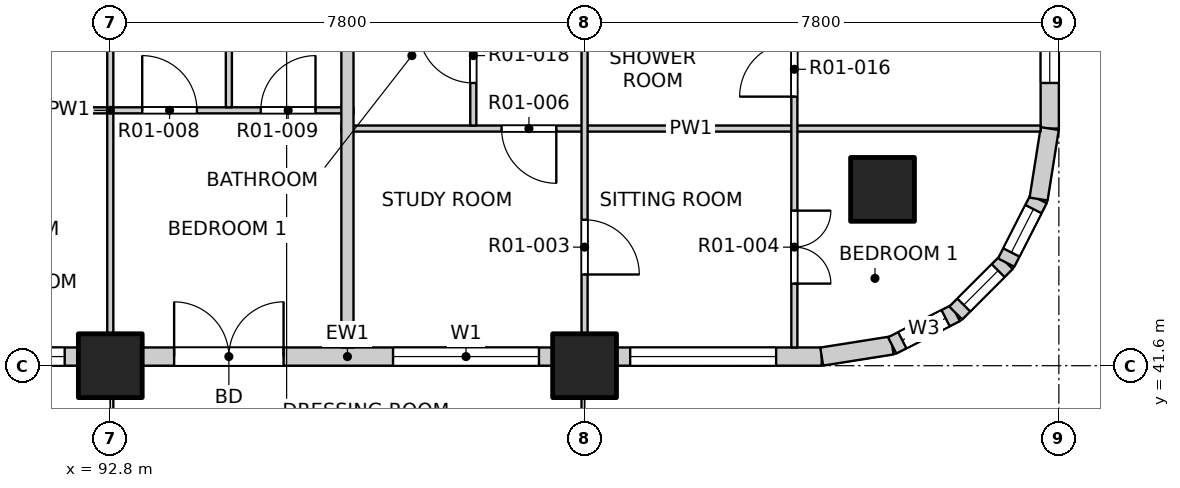
"""IFC4 building model, lengths in metres.
Left out: names, types, materials, properties, quantities, classifications, styles, units other than length and angle.
Written with IfcOpenShell. Run it as: python <this file> out.ifc"""

import sys

from ifc_helpers import new_model, si_unit, direction, frame, frame_2d, origin, origin_2d, place, context, subcontext, project, spatial, rectangle, extrude, element, fill, save


model = new_model("IFC4")
c1 = context("Model", 3, precision=1e-05, world=origin(), true_north=direction((0.0, 1.0)))
c2 = subcontext(c1, "Body", "Model", "MODEL_VIEW")
j1 = project(units=[si_unit("LENGTHUNIT", "METRE"), si_unit("PLANEANGLEUNIT", "RADIAN")], contexts=[c1])
p1 = place(None, origin())
s1 = spatial("IfcSite", under=j1, at=p1, CompositionType="ELEMENT")
p2 = place(p1, origin())
s2 = spatial("IfcBuilding", under=s1, at=p2, CompositionType="ELEMENT")
p3 = place(p2, frame((0.0, 0.0, 19.5)))
s3 = spatial("IfcBuildingStorey", under=s2, at=p3, CompositionType="ELEMENT", Elevation=19.5)
for number, where, z_axis, x_axis in (
    (1, (105.5, 44.5, -0.25), (0.0, 0.0, 1.0), (1.0, 0.0, 0.0)),
    (2, (92.8, 41.6, -0.25), (0.0, 0.0, 1.0), (1.0, 0.0, 0.0)),
    (3, (100.6, 41.6, -0.25), (0.0, 0.0, 1.0), (1.0, 0.0, 0.0)),
):
    element("IfcColumn", number, at=place(p3, frame(where, z_axis=z_axis, x_axis=x_axis)), inside=s3, PredefinedType="COLUMN", context=c2, shape_type="SweptSolid", body=[
        extrude(rectangle(XDim=1.05, YDim=1.05, at=origin_2d()), origin(), (0.0, 0.0, 1.0), 3.4),
    ])
p4 = place(p3, frame((85.525, 41.75, 0.0), z_axis=(0.0, 0.0, 1.0), x_axis=(1.0, 0.0, 0.0)))
e4 = element("IfcWall", 4, at=p4, inside=s3, PredefinedType="SOLIDWALL", context=c2, shape_type="SweptSolid", body=[
    extrude(rectangle(XDim=6.75, YDim=0.3, at=frame_2d((3.375, 0.0))), origin(), (0.0, 0.0, 1.0), 2.7),
])
p5 = place(p4, frame((0.225, 0.0, 0.9)))
e5 = element("IfcOpeningElement", 5, at=p5, cuts=e4, PredefinedType="OPENING", context=c2, shape_type="SweptSolid", body=[
    extrude(rectangle(XDim=2.4, YDim=1.8, at=frame_2d((1.2, 0.9))), frame((0.0, 0.16, 0.0), z_axis=(0.0, -1.0, 0.0), x_axis=(1.0, 0.0, 0.0)), (0.0, 0.0, 1.0), 0.32),
])
p6 = place(p4, frame((4.125, 0.0, 0.9)))
e6 = element("IfcOpeningElement", 6, at=p6, cuts=e4, PredefinedType="OPENING", context=c2, shape_type="SweptSolid", body=[
    extrude(rectangle(XDim=2.4, YDim=1.8, at=frame_2d((1.2, 0.9))), frame((0.0, 0.16, 0.0), z_axis=(0.0, -1.0, 0.0), x_axis=(1.0, 0.0, 0.0)), (0.0, 0.0, 1.0), 0.32),
])
p7 = place(p3, frame((93.325, 41.75, 0.0), z_axis=(0.0, 0.0, 1.0), x_axis=(1.0, 0.0, 0.0)))
e7 = element("IfcWall", 7, at=p7, inside=s3, PredefinedType="SOLIDWALL", context=c2, shape_type="SweptSolid", body=[
    extrude(rectangle(XDim=6.75, YDim=0.3, at=frame_2d((3.375, 0.0))), origin(), (0.0, 0.0, 1.0), 2.7),
])
p8 = place(p7, frame((0.525, 0.0, 0.0)))
e8 = element("IfcOpeningElement", 8, at=p8, cuts=e7, PredefinedType="OPENING", context=c2, shape_type="SweptSolid", body=[
    extrude(rectangle(XDim=1.8, YDim=2.4, at=frame_2d((0.9, 1.2))), frame((0.0, 0.16, 0.0), z_axis=(0.0, -1.0, 0.0), x_axis=(1.0, 0.0, 0.0)), (0.0, 0.0, 1.0), 0.32),
])
p9 = place(p7, frame((4.125, 0.0, 0.9)))
e9 = element("IfcOpeningElement", 9, at=p9, cuts=e7, PredefinedType="OPENING", context=c2, shape_type="SweptSolid", body=[
    extrude(rectangle(XDim=2.4, YDim=1.8, at=frame_2d((1.2, 0.9))), frame((0.0, 0.16, 0.0), z_axis=(0.0, -1.0, 0.0), x_axis=(1.0, 0.0, 0.0)), (0.0, 0.0, 1.0), 0.32),
])
p10 = place(p3, frame((101.125, 41.75, 0.0), z_axis=(0.0, 0.0, 1.0), x_axis=(1.0, 0.0, 0.0)))
e10 = element("IfcWall", 10, at=p10, inside=s3, PredefinedType="SOLIDWALL", context=c2, shape_type="SweptSolid", body=[
    extrude(rectangle(XDim=3.375, YDim=0.3, at=frame_2d((1.688, 0.0))), origin(), (0.0, 0.0, 1.0), 2.7),
])
p11 = place(p10, frame((0.225, 0.0, 0.9)))
e11 = element("IfcOpeningElement", 11, at=p11, cuts=e10, PredefinedType="OPENING", context=c2, shape_type="SweptSolid", body=[
    extrude(rectangle(XDim=2.4, YDim=1.8, at=frame_2d((1.2, 0.9))), frame((0.0, 0.16, 0.0), z_axis=(0.0, -1.0, 0.0), x_axis=(1.0, 0.0, 0.0)), (0.0, 0.0, 1.0), 0.32),
])
p12 = place(p3, frame((108.25, 45.5, 0.0), z_axis=(0.0, 0.0, 1.0), x_axis=(0.0, 1.0, 0.0)))
e12 = element("IfcWall", 12, at=p12, inside=s3, PredefinedType="SOLIDWALL", context=c2, shape_type="SweptSolid", body=[
    extrude(rectangle(XDim=3.375, YDim=0.3, at=frame_2d((1.688, 0.0))), origin(), (0.0, 0.0, 1.0), 2.7),
])
p13 = place(p12, frame((0.75, 0.0, 0.9)))
e13 = element("IfcOpeningElement", 13, at=p13, cuts=e12, PredefinedType="OPENING", context=c2, shape_type="SweptSolid", body=[
    extrude(rectangle(XDim=2.4, YDim=1.8, at=frame_2d((1.2, 0.9))), frame((0.0, 0.16, 0.0), z_axis=(0.0, -1.0, 0.0), x_axis=(1.0, 0.0, 0.0)), (0.0, 0.0, 1.0), 0.32),
])
p14 = place(p3, frame((104.5, 41.75, 0.0), z_axis=(0.0, 0.0, 1.0), x_axis=(0.987678452879, 0.156496880861, 0.0)))
e14 = element("IfcWall", 14, at=p14, inside=s3, PredefinedType="SOLIDWALL", context=c2, shape_type="SweptSolid", body=[
    extrude(rectangle(XDim=1.173, YDim=0.3, at=frame_2d((0.586, 0.0))), origin(), (0.0, 0.0, 1.0), 2.7),
])
p15 = place(p3, frame((105.659, 41.934, 0.0), z_axis=(0.0, 0.0, 1.0), x_axis=(0.890988677504, 0.454025524128, 0.0)))
e15 = element("IfcWall", 15, at=p15, inside=s3, PredefinedType="SOLIDWALL", context=c2, shape_type="SweptSolid", body=[
    extrude(rectangle(XDim=1.173, YDim=0.3, at=frame_2d((0.587, 0.0))), origin(), (0.0, 0.0, 1.0), 2.7),
])
p16 = place(p15, frame((0.187, 0.0, 0.9)))
e16 = element("IfcOpeningElement", 16, at=p16, cuts=e15, PredefinedType="OPENING", context=c2, shape_type="SweptSolid", body=[
    extrude(rectangle(XDim=0.8, YDim=1.2, at=frame_2d((0.4, 0.6))), frame((0.0, 0.16, 0.0), z_axis=(0.0, -1.0, 0.0), x_axis=(1.0, 0.0, 0.0)), (0.0, 0.0, 1.0), 0.32),
])
p17 = place(p3, frame((106.704, 42.466, 0.0), z_axis=(0.0, 0.0, 1.0), x_axis=(0.707106781187, 0.707106781187, 0.0)))
e17 = element("IfcWall", 17, at=p17, inside=s3, PredefinedType="SOLIDWALL", context=c2, shape_type="SweptSolid", body=[
    extrude(rectangle(XDim=1.173, YDim=0.3, at=frame_2d((0.586, 0.0))), origin(), (0.0, 0.0, 1.0), 2.7),
])
p18 = place(p17, frame((0.187, 0.0, 0.9)))
e18 = element("IfcOpeningElement", 18, at=p18, cuts=e17, PredefinedType="OPENING", context=c2, shape_type="SweptSolid", body=[
    extrude(rectangle(XDim=0.8, YDim=1.2, at=frame_2d((0.4, 0.6))), frame((0.0, 0.16, 0.0), z_axis=(0.0, -1.0, 0.0), x_axis=(1.0, 0.0, 0.0)), (0.0, 0.0, 1.0), 0.32),
])
p19 = place(p3, frame((107.534, 43.296, 0.0), z_axis=(0.0, 0.0, 1.0), x_axis=(0.454025524128, 0.890988677504, 0.0)))
e19 = element("IfcWall", 19, at=p19, inside=s3, PredefinedType="SOLIDWALL", context=c2, shape_type="SweptSolid", body=[
    extrude(rectangle(XDim=1.173, YDim=0.3, at=frame_2d((0.587, 0.0))), origin(), (0.0, 0.0, 1.0), 2.7),
])
p20 = place(p19, frame((0.187, 0.0, 0.9)))
e20 = element("IfcOpeningElement", 20, at=p20, cuts=e19, PredefinedType="OPENING", context=c2, shape_type="SweptSolid", body=[
    extrude(rectangle(XDim=0.8, YDim=1.2, at=frame_2d((0.4, 0.6))), frame((0.0, 0.16, 0.0), z_axis=(0.0, -1.0, 0.0), x_axis=(1.0, 0.0, 0.0)), (0.0, 0.0, 1.0), 0.32),
])
p21 = place(p3, frame((108.066, 44.341, 0.0), z_axis=(0.0, 0.0, 1.0), x_axis=(0.156496880861, 0.987678452879, 0.0)))
e21 = element("IfcWall", 21, at=p21, inside=s3, PredefinedType="SOLIDWALL", context=c2, shape_type="SweptSolid", body=[
    extrude(rectangle(XDim=1.173, YDim=0.3, at=frame_2d((0.586, 0.0))), origin(), (0.0, 0.0, 1.0), 2.7),
])
p22 = place(p3, frame((96.6, 45.5, 0.0), z_axis=(0.0, 0.0, 1.0), x_axis=(1.0, 0.0, 0.0)))
e22 = element("IfcWall", 22, at=p22, inside=s3, PredefinedType="PARTITIONING", context=c2, shape_type="SweptSolid", body=[
    extrude(rectangle(XDim=11.5, YDim=0.1, at=frame_2d((5.75, 0.0))), origin(), (0.0, 0.0, 1.0), 3.15),
])
p23 = place(p22, frame((2.635, 0.0, 0.0)))
e23 = element("IfcOpeningElement", 23, at=p23, cuts=e22, PredefinedType="OPENING", context=c2, shape_type="SweptSolid", body=[
    extrude(rectangle(XDim=0.9, YDim=2.1, at=frame_2d((0.45, 1.05))), frame((0.0, 0.06, 0.0), z_axis=(0.0, -1.0, 0.0), x_axis=(1.0, 0.0, 0.0)), (0.0, 0.0, 1.0), 0.12),
])
p24 = place(p3, frame((88.8, 45.8, 0.0), z_axis=(0.0, 0.0, 1.0), x_axis=(1.0, 0.0, 0.0)))
e24 = element("IfcWall", 24, at=p24, inside=s3, PredefinedType="PARTITIONING", context=c2, shape_type="SweptSolid", body=[
    extrude(rectangle(XDim=8.0, YDim=0.1, at=frame_2d((4.0, 0.0))), origin(), (0.0, 0.0, 1.0), 3.15),
])
p25 = place(p24, frame((1.45, 0.0, 0.0)))
e25 = element("IfcOpeningElement", 25, at=p25, cuts=e24, PredefinedType="OPENING", context=c2, shape_type="SweptSolid", body=[
    extrude(rectangle(XDim=1.2, YDim=2.1, at=frame_2d((0.6, 1.05))), frame((0.0, 0.06, 0.0), z_axis=(0.0, -1.0, 0.0), x_axis=(1.0, 0.0, 0.0)), (0.0, 0.0, 1.0), 0.12),
])
p26 = place(p24, frame((4.525, 0.0, 0.0)))
e26 = element("IfcOpeningElement", 26, at=p26, cuts=e24, PredefinedType="OPENING", context=c2, shape_type="SweptSolid", body=[
    extrude(rectangle(XDim=0.9, YDim=2.1, at=frame_2d((0.45, 1.05))), frame((0.0, 0.06, 0.0), z_axis=(0.0, -1.0, 0.0), x_axis=(1.0, 0.0, 0.0)), (0.0, 0.0, 1.0), 0.12),
])
p27 = place(p24, frame((6.475, 0.0, 0.0)))
e27 = element("IfcOpeningElement", 27, at=p27, cuts=e24, PredefinedType="OPENING", context=c2, shape_type="SweptSolid", body=[
    extrude(rectangle(XDim=0.9, YDim=2.1, at=frame_2d((0.45, 1.05))), frame((0.0, 0.06, 0.0), z_axis=(0.0, -1.0, 0.0), x_axis=(1.0, 0.0, 0.0)), (0.0, 0.0, 1.0), 0.12),
])
p28 = place(p3, frame((92.8, 41.9, 0.0), z_axis=(0.0, 0.0, 1.0), x_axis=(0.0, 1.0, 0.0)))
e28 = element("IfcWall", 28, at=p28, inside=s3, PredefinedType="PARTITIONING", context=c2, shape_type="SweptSolid", body=[
    extrude(rectangle(XDim=7.45, YDim=0.1, at=frame_2d((3.725, 0.0))), origin(), (0.0, 0.0, 1.0), 2.55),
])
p29 = place(p3, frame((94.75, 45.85, 0.0), z_axis=(0.0, 0.0, 1.0), x_axis=(0.0, 1.0, 0.0)))
e29 = element("IfcWall", 29, at=p29, inside=s3, PredefinedType="PARTITIONING", context=c2, shape_type="SweptSolid", body=[
    extrude(rectangle(XDim=3.5, YDim=0.1, at=frame_2d((1.75, 0.0))), origin(), (0.0, 0.0, 1.0), 3.15),
])
p30 = place(p3, frame((96.7, 41.9, 0.0), z_axis=(0.0, 0.0, 1.0), x_axis=(0.0, 1.0, 0.0)))
e30 = element("IfcWall", 30, at=p30, inside=s3, PredefinedType="PARTITIONING", context=c2, shape_type="SweptSolid", body=[
    extrude(rectangle(XDim=11.3, YDim=0.2, at=frame_2d((5.65, 0.0))), origin(), (0.0, 0.0, 1.0), 3.15),
])
p31 = place(p3, frame((98.77, 45.55, 0.0), z_axis=(0.0, 0.0, 1.0), x_axis=(0.0, 1.0, 0.0)))
e31 = element("IfcWall", 31, at=p31, inside=s3, PredefinedType="PARTITIONING", context=c2, shape_type="SweptSolid", body=[
    extrude(rectangle(XDim=12.1, YDim=0.1, at=frame_2d((6.05, 0.0))), origin(), (0.0, 0.0, 1.0), 3.15),
])
p32 = place(p31, frame((0.7, 0.0, 0.0)))
e32 = element("IfcOpeningElement", 32, at=p32, cuts=e31, PredefinedType="OPENING", context=c2, shape_type="SweptSolid", body=[
    extrude(rectangle(XDim=0.9, YDim=2.1, at=frame_2d((0.45, 1.05))), frame((0.0, 0.06, 0.0), z_axis=(0.0, -1.0, 0.0), x_axis=(1.0, 0.0, 0.0)), (0.0, 0.0, 1.0), 0.12),
])
p33 = place(p31, frame((3.325, 0.0, 0.0)))
e33 = element("IfcOpeningElement", 33, at=p33, cuts=e31, PredefinedType="OPENING", context=c2, shape_type="SweptSolid", body=[
    extrude(rectangle(XDim=0.8, YDim=2.1, at=frame_2d((0.4, 1.05))), frame((0.0, 0.06, 0.0), z_axis=(0.0, -1.0, 0.0), x_axis=(1.0, 0.0, 0.0)), (0.0, 0.0, 1.0), 0.12),
])
p34 = place(p31, frame((6.15, 0.0, 0.0)))
e34 = element("IfcOpeningElement", 34, at=p34, cuts=e31, PredefinedType="OPENING", context=c2, shape_type="SweptSolid", body=[
    extrude(rectangle(XDim=0.8, YDim=2.1, at=frame_2d((0.4, 1.05))), frame((0.0, 0.06, 0.0), z_axis=(0.0, -1.0, 0.0), x_axis=(1.0, 0.0, 0.0)), (0.0, 0.0, 1.0), 0.12),
])
p35 = place(p31, frame((8.75, 0.0, 0.0)))
e35 = element("IfcOpeningElement", 35, at=p35, cuts=e31, PredefinedType="OPENING", context=c2, shape_type="SweptSolid", body=[
    extrude(rectangle(XDim=0.8, YDim=2.1, at=frame_2d((0.4, 1.05))), frame((0.0, 0.06, 0.0), z_axis=(0.0, -1.0, 0.0), x_axis=(1.0, 0.0, 0.0)), (0.0, 0.0, 1.0), 0.12),
])
p36 = place(p31, frame((10.775, 0.0, 0.0)))
e36 = element("IfcOpeningElement", 36, at=p36, cuts=e31, PredefinedType="OPENING", context=c2, shape_type="SweptSolid", body=[
    extrude(rectangle(XDim=0.9, YDim=2.1, at=frame_2d((0.45, 1.05))), frame((0.0, 0.06, 0.0), z_axis=(0.0, -1.0, 0.0), x_axis=(1.0, 0.0, 0.0)), (0.0, 0.0, 1.0), 0.12),
])
p37 = place(p3, frame((100.6, 41.9, 0.0), z_axis=(0.0, 0.0, 1.0), x_axis=(0.0, 1.0, 0.0)))
e37 = element("IfcWall", 37, at=p37, inside=s3, PredefinedType="PARTITIONING", context=c2, shape_type="SweptSolid", body=[
    extrude(rectangle(XDim=7.5, YDim=0.1, at=frame_2d((3.75, 0.0))), origin(), (0.0, 0.0, 1.0), 2.55),
])
p38 = place(p37, frame((1.2, 0.0, 0.0)))
e38 = element("IfcOpeningElement", 38, at=p38, cuts=e37, PredefinedType="OPENING", context=c2, shape_type="SweptSolid", body=[
    extrude(rectangle(XDim=0.9, YDim=2.1, at=frame_2d((0.45, 1.05))), frame((0.0, 0.06, 0.0), z_axis=(0.0, -1.0, 0.0), x_axis=(1.0, 0.0, 0.0)), (0.0, 0.0, 1.0), 0.12),
])
p39 = place(p37, frame((5.9, 0.0, 0.0)))
e39 = element("IfcOpeningElement", 39, at=p39, cuts=e37, PredefinedType="OPENING", context=c2, shape_type="SweptSolid", body=[
    extrude(rectangle(XDim=0.9, YDim=2.1, at=frame_2d((0.45, 1.05))), frame((0.0, 0.06, 0.0), z_axis=(0.0, -1.0, 0.0), x_axis=(1.0, 0.0, 0.0)), (0.0, 0.0, 1.0), 0.12),
])
p40 = place(p3, frame((104.05, 41.9, 0.0), z_axis=(0.0, 0.0, 1.0), x_axis=(0.0, 1.0, 0.0)))
e40 = element("IfcWall", 40, at=p40, inside=s3, PredefinedType="PARTITIONING", context=c2, shape_type="SweptSolid", body=[
    extrude(rectangle(XDim=19.1, YDim=0.1, at=frame_2d((9.55, 0.0))), origin(), (0.0, 0.0, 1.0), 3.15),
])
p41 = place(p40, frame((1.05, 0.0, 0.0)))
e41 = element("IfcOpeningElement", 41, at=p41, cuts=e40, PredefinedType="OPENING", context=c2, shape_type="SweptSolid", body=[
    extrude(rectangle(XDim=1.2, YDim=2.1, at=frame_2d((0.6, 1.05))), frame((0.0, 0.06, 0.0), z_axis=(0.0, -1.0, 0.0), x_axis=(1.0, 0.0, 0.0)), (0.0, 0.0, 1.0), 0.12),
])
p42 = place(p40, frame((4.125, 0.0, 0.0)))
e42 = element("IfcOpeningElement", 42, at=p42, cuts=e40, PredefinedType="OPENING", context=c2, shape_type="SweptSolid", body=[
    extrude(rectangle(XDim=0.9, YDim=2.1, at=frame_2d((0.45, 1.05))), frame((0.0, 0.06, 0.0), z_axis=(0.0, -1.0, 0.0), x_axis=(1.0, 0.0, 0.0)), (0.0, 0.0, 1.0), 0.12),
])
p43 = place(p40, frame((6.075, 0.0, 0.0)))
e43 = element("IfcOpeningElement", 43, at=p43, cuts=e40, PredefinedType="OPENING", context=c2, shape_type="SweptSolid", body=[
    extrude(rectangle(XDim=0.9, YDim=2.1, at=frame_2d((0.45, 1.05))), frame((0.0, 0.06, 0.0), z_axis=(0.0, -1.0, 0.0), x_axis=(1.0, 0.0, 0.0)), (0.0, 0.0, 1.0), 0.12),
])
p44 = place(p40, frame((8.85, 0.0, 0.0)))
e44 = element("IfcOpeningElement", 44, at=p44, cuts=e40, PredefinedType="OPENING", context=c2, shape_type="SweptSolid", body=[
    extrude(rectangle(XDim=1.2, YDim=2.1, at=frame_2d((0.6, 1.05))), frame((0.0, 0.06, 0.0), z_axis=(0.0, -1.0, 0.0), x_axis=(1.0, 0.0, 0.0)), (0.0, 0.0, 1.0), 0.12),
])
p45 = place(p40, frame((12.75, 0.0, 0.0)))
e45 = element("IfcOpeningElement", 45, at=p45, cuts=e40, PredefinedType="OPENING", context=c2, shape_type="SweptSolid", body=[
    extrude(rectangle(XDim=1.2, YDim=2.1, at=frame_2d((0.6, 1.05))), frame((0.0, 0.06, 0.0), z_axis=(0.0, -1.0, 0.0), x_axis=(1.0, 0.0, 0.0)), (0.0, 0.0, 1.0), 0.12),
])
p46 = place(p40, frame((15.825, 0.0, 0.0)))
e46 = element("IfcOpeningElement", 46, at=p46, cuts=e40, PredefinedType="OPENING", context=c2, shape_type="SweptSolid", body=[
    extrude(rectangle(XDim=0.9, YDim=2.1, at=frame_2d((0.45, 1.05))), frame((0.0, 0.06, 0.0), z_axis=(0.0, -1.0, 0.0), x_axis=(1.0, 0.0, 0.0)), (0.0, 0.0, 1.0), 0.12),
])
p47 = place(p40, frame((17.775, 0.0, 0.0)))
e47 = element("IfcOpeningElement", 47, at=p47, cuts=e40, PredefinedType="OPENING", context=c2, shape_type="SweptSolid", body=[
    extrude(rectangle(XDim=0.9, YDim=2.1, at=frame_2d((0.45, 1.05))), frame((0.0, 0.06, 0.0), z_axis=(0.0, -1.0, 0.0), x_axis=(1.0, 0.0, 0.0)), (0.0, 0.0, 1.0), 0.12),
])
p48 = place(p6, origin())
e48 = element("IfcWindow", 48, at=p48, inside=s3, PartitioningType="DOUBLE_PANEL_VERTICAL", PredefinedType="WINDOW", context=c2, shape_type="SweptSolid", body=[
    extrude(rectangle(XDim=2.4, YDim=1.8, at=frame_2d((1.2, 0.9))), frame((0.0, 0.03, 0.0), z_axis=(0.0, -1.0, 0.0), x_axis=(1.0, 0.0, 0.0)), (0.0, 0.0, 1.0), 0.06),
])
fill(e6, e48)
p49 = place(p8, origin())
e49 = element("IfcDoor", 49, at=p49, inside=s3, OperationType="DOUBLE_DOOR_SINGLE_SWING", PredefinedType="DOOR", context=c2, shape_type="SweptSolid", body=[
    extrude(rectangle(XDim=1.8, YDim=2.4, at=frame_2d((0.9, 1.2))), frame((0.0, 0.025, 0.0), z_axis=(0.0, -1.0, 0.0), x_axis=(1.0, 0.0, 0.0)), (0.0, 0.0, 1.0), 0.05),
])
fill(e8, e49)
p50 = place(p9, origin())
e50 = element("IfcWindow", 50, at=p50, inside=s3, PartitioningType="DOUBLE_PANEL_VERTICAL", PredefinedType="WINDOW", context=c2, shape_type="SweptSolid", body=[
    extrude(rectangle(XDim=2.4, YDim=1.8, at=frame_2d((1.2, 0.9))), frame((0.0, 0.03, 0.0), z_axis=(0.0, -1.0, 0.0), x_axis=(1.0, 0.0, 0.0)), (0.0, 0.0, 1.0), 0.06),
])
fill(e9, e50)
p51 = place(p11, origin())
e51 = element("IfcWindow", 51, at=p51, inside=s3, PartitioningType="DOUBLE_PANEL_VERTICAL", PredefinedType="WINDOW", context=c2, shape_type="SweptSolid", body=[
    extrude(rectangle(XDim=2.4, YDim=1.8, at=frame_2d((1.2, 0.9))), frame((0.0, 0.03, 0.0), z_axis=(0.0, -1.0, 0.0), x_axis=(1.0, 0.0, 0.0)), (0.0, 0.0, 1.0), 0.06),
])
fill(e11, e51)
p52 = place(p13, origin())
e52 = element("IfcWindow", 52, at=p52, inside=s3, PartitioningType="DOUBLE_PANEL_VERTICAL", PredefinedType="WINDOW", context=c2, shape_type="SweptSolid", body=[
    extrude(rectangle(XDim=2.4, YDim=1.8, at=frame_2d((1.2, 0.9))), frame((0.0, 0.03, 0.0), z_axis=(0.0, -1.0, 0.0), x_axis=(1.0, 0.0, 0.0)), (0.0, 0.0, 1.0), 0.06),
])
fill(e13, e52)
p53 = place(p16, origin())
e53 = element("IfcWindow", 53, at=p53, inside=s3, PartitioningType="SINGLE_PANEL", PredefinedType="WINDOW", context=c2, shape_type="SweptSolid", body=[
    extrude(rectangle(XDim=0.8, YDim=1.2, at=frame_2d((0.4, 0.6))), frame((0.0, 0.03, 0.0), z_axis=(0.0, -1.0, 0.0), x_axis=(1.0, 0.0, 0.0)), (0.0, 0.0, 1.0), 0.06),
])
fill(e16, e53)
p54 = place(p18, origin())
e54 = element("IfcWindow", 54, at=p54, inside=s3, PartitioningType="SINGLE_PANEL", PredefinedType="WINDOW", context=c2, shape_type="SweptSolid", body=[
    extrude(rectangle(XDim=0.8, YDim=1.2, at=frame_2d((0.4, 0.6))), frame((0.0, 0.03, 0.0), z_axis=(0.0, -1.0, 0.0), x_axis=(1.0, 0.0, 0.0)), (0.0, 0.0, 1.0), 0.06),
])
fill(e18, e54)
p55 = place(p20, origin())
e55 = element("IfcWindow", 55, at=p55, inside=s3, PartitioningType="SINGLE_PANEL", PredefinedType="WINDOW", context=c2, shape_type="SweptSolid", body=[
    extrude(rectangle(XDim=0.8, YDim=1.2, at=frame_2d((0.4, 0.6))), frame((0.0, 0.03, 0.0), z_axis=(0.0, -1.0, 0.0), x_axis=(1.0, 0.0, 0.0)), (0.0, 0.0, 1.0), 0.06),
])
fill(e20, e55)
p56 = place(p38, origin())
e56 = element("IfcDoor", 56, at=p56, inside=s3, OperationType="SINGLE_SWING_RIGHT", PredefinedType="DOOR", context=c2, shape_type="SweptSolid", body=[
    extrude(rectangle(XDim=0.9, YDim=2.1, at=frame_2d((0.45, 1.05))), frame((0.0, 0.025, 0.0), z_axis=(0.0, -1.0, 0.0), x_axis=(1.0, 0.0, 0.0)), (0.0, 0.0, 1.0), 0.05),
])
fill(e38, e56)
p57 = place(p41, origin())
e57 = element("IfcDoor", 57, at=p57, inside=s3, OperationType="DOUBLE_DOOR_SINGLE_SWING", PredefinedType="DOOR", context=c2, shape_type="SweptSolid", body=[
    extrude(rectangle(XDim=1.2, YDim=2.1, at=frame_2d((0.6, 1.05))), frame((0.0, 0.025, 0.0), z_axis=(0.0, -1.0, 0.0), x_axis=(1.0, 0.0, 0.0)), (0.0, 0.0, 1.0), 0.05),
])
fill(e41, e57)
p58 = place(p23, origin())
e58 = element("IfcDoor", 58, at=p58, inside=s3, OperationType="SINGLE_SWING_LEFT", PredefinedType="DOOR", context=c2, shape_type="SweptSolid", body=[
    extrude(rectangle(XDim=0.9, YDim=2.1, at=frame_2d((0.45, 1.05))), frame((0.0, 0.025, 0.0), z_axis=(0.0, -1.0, 0.0), x_axis=(1.0, 0.0, 0.0)), (0.0, 0.0, 1.0), 0.05),
])
fill(e23, e58)
p59 = place(p26, origin())
e59 = element("IfcDoor", 59, at=p59, inside=s3, OperationType="SINGLE_SWING_LEFT", PredefinedType="DOOR", context=c2, shape_type="SweptSolid", body=[
    extrude(rectangle(XDim=0.9, YDim=2.1, at=frame_2d((0.45, 1.05))), frame((0.0, 0.025, 0.0), z_axis=(0.0, -1.0, 0.0), x_axis=(1.0, 0.0, 0.0)), (0.0, 0.0, 1.0), 0.05),
])
fill(e26, e59)
p60 = place(p27, origin())
e60 = element("IfcDoor", 60, at=p60, inside=s3, OperationType="SINGLE_SWING_RIGHT", PredefinedType="DOOR", context=c2, shape_type="SweptSolid", body=[
    extrude(rectangle(XDim=0.9, YDim=2.1, at=frame_2d((0.45, 1.05))), frame((0.0, 0.025, 0.0), z_axis=(0.0, -1.0, 0.0), x_axis=(1.0, 0.0, 0.0)), (0.0, 0.0, 1.0), 0.05),
])
fill(e27, e60)
p61 = place(p42, origin())
e61 = element("IfcDoor", 61, at=p61, inside=s3, OperationType="SINGLE_SWING_LEFT", PredefinedType="DOOR", context=c2, shape_type="SweptSolid", body=[
    extrude(rectangle(XDim=0.9, YDim=2.1, at=frame_2d((0.45, 1.05))), frame((0.0, 0.025, 0.0), z_axis=(0.0, -1.0, 0.0), x_axis=(1.0, 0.0, 0.0)), (0.0, 0.0, 1.0), 0.05),
])
fill(e42, e61)
p62 = place(p32, origin())
e62 = element("IfcDoor", 62, at=p62, inside=s3, OperationType="SINGLE_SWING_RIGHT", PredefinedType="DOOR", context=c2, shape_type="SweptSolid", body=[
    extrude(rectangle(XDim=0.9, YDim=2.1, at=frame_2d((0.45, 1.05))), frame((0.0, 0.025, 0.0), z_axis=(0.0, -1.0, 0.0), x_axis=(1.0, 0.0, 0.0)), (0.0, 0.0, 1.0), 0.05),
])
fill(e32, e62)
save(model, sys.argv[1])
